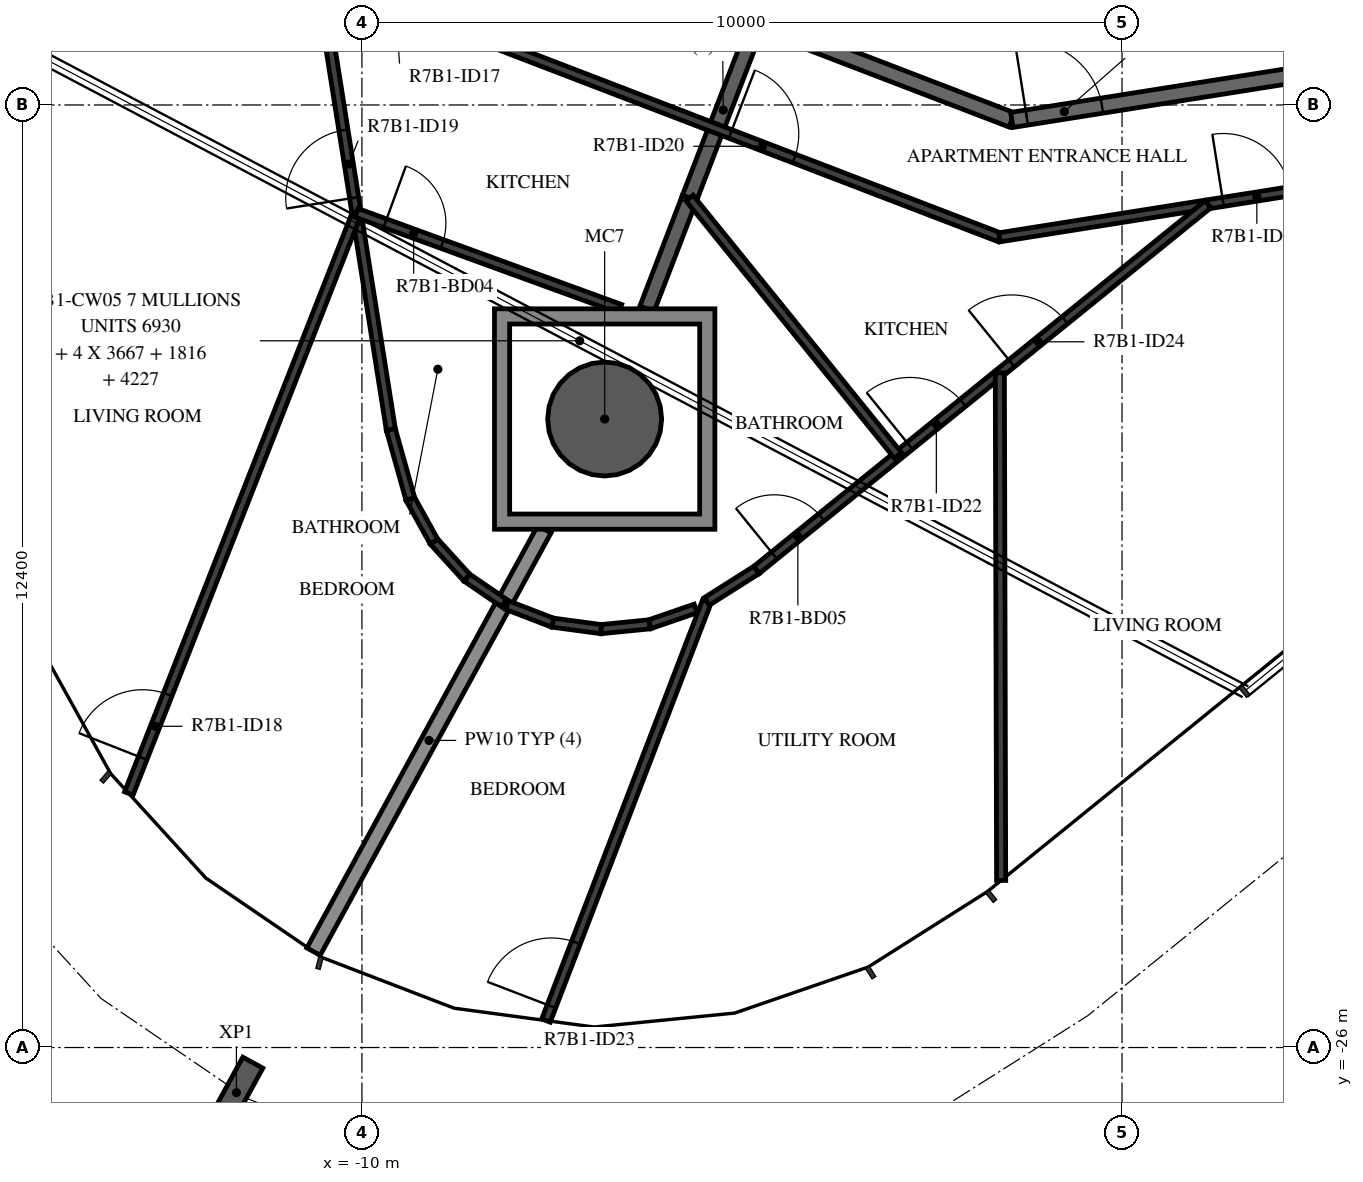
"""IFC4 building model, lengths in metres.
Left out: names, types, materials, properties, quantities, classifications, styles, units other than length and angle.
Written with IfcOpenShell. Run it as: python <this file> out.ifc"""

import sys

from ifc_helpers import new_model, si_unit, direction, frame, frame_2d, origin, origin_2d, place, context, subcontext, project, spatial, polyline, rectangle, hollow_circle, i_section, outline, extrude, element, fill, save


model = new_model("IFC4")
c1 = context("Model", 3, precision=1e-05, world=origin(), true_north=direction((0.0, 1.0)))
c2 = subcontext(c1, "Body", "Model", "MODEL_VIEW")
j1 = project(units=[si_unit("LENGTHUNIT", "METRE"), si_unit("PLANEANGLEUNIT", "RADIAN")], contexts=[c1])
p1 = place(None, origin())
s1 = spatial("IfcSite", under=j1, at=p1, CompositionType="ELEMENT")
p2 = place(p1, origin())
s2 = spatial("IfcBuilding", under=s1, at=p2, CompositionType="ELEMENT")
p3 = place(p2, frame((0.0, 0.0, 273.9)))
s3 = spatial("IfcBuildingStorey", under=s2, at=p3, CompositionType="ELEMENT", Elevation=273.9)
p4 = place(p3, frame((-6.807, -17.732, -0.38), z_axis=(0.0, 0.0, 1.0), x_axis=(1.0, 0.0, 0.0)))
e1 = element("IfcColumn", 1, at=p4, inside=s3, PredefinedType="COLUMN", context=c2, shape_type="SweptSolid", body=[
    extrude(hollow_circle(Radius=0.75, WallThickness=0.035, at=origin_2d()), origin(), (0.0, 0.0, 1.0), 3.5),
])
p5 = place(p3, frame((-11.652, -26.594, -0.38), z_axis=(0.0, 0.0, 1.0), x_axis=(-0.877434810632, 0.479695896472, 0.0)))
e2 = element("IfcColumn", 2, at=p5, inside=s3, PredefinedType="COLUMN", context=c2, shape_type="SweptSolid", body=[
    extrude(i_section(OverallWidth=0.3, OverallDepth=0.9, WebThickness=0.019, FlangeThickness=0.035, FilletRadius=0.03, at=origin_2d()), origin(), (0.0, 0.0, 1.0), 3.5),
])
p6 = place(p3, frame((-8.154, -11.223, 0.0), z_axis=(0.0, 0.0, 1.0), x_axis=(0.93359073609, -0.358341090983, 0.0)))
e3 = element("IfcWall", 3, at=p6, inside=s3, PredefinedType="STANDARD", context=c2, shape_type="SweptSolid", body=[
    extrude(rectangle(XDim=7.181, YDim=0.2, at=frame_2d((3.59, 0.0))), origin(), (0.0, 0.0, 1.0), 3.12),
])
p7 = place(p6, frame((2.39, 0.0, 0.0)))
e4 = element("IfcOpeningElement", 4, at=p7, cuts=e3, PredefinedType="OPENING", context=c2, shape_type="SweptSolid", body=[
    extrude(rectangle(XDim=1.0, YDim=2.1, at=frame_2d((0.5, 1.05))), frame((0.0, 0.11, 0.0), z_axis=(0.0, -1.0, 0.0), x_axis=(1.0, 0.0, 0.0)), (0.0, 0.0, 1.0), 0.22),
])
p8 = place(p3, frame((-1.45, -13.797, 0.0), z_axis=(0.0, 0.0, 1.0), x_axis=(0.987690361611, 0.156421704315, 0.0)))
e5 = element("IfcWall", 5, at=p8, inside=s3, PredefinedType="STANDARD", context=c2, shape_type="SweptSolid", body=[
    extrude(rectangle(XDim=7.181, YDim=0.2, at=frame_2d((3.591, 0.0))), origin(), (0.0, 0.0, 1.0), 3.12),
])
p9 = place(p8, frame((0.2, 0.0, 0.0)))
e6 = element("IfcOpeningElement", 6, at=p9, cuts=e5, PredefinedType="OPENING", context=c2, shape_type="SweptSolid", body=[
    extrude(rectangle(XDim=1.0, YDim=2.1, at=frame_2d((0.5, 1.05))), frame((0.0, 0.11, 0.0), z_axis=(0.0, -1.0, 0.0), x_axis=(1.0, 0.0, 0.0)), (0.0, 0.0, 1.0), 0.22),
])
p10 = place(p3, frame((-5.69, -14.824, 0.0), z_axis=(0.0, 0.0, 1.0), x_axis=(0.358345342952, 0.933589104041, 0.0)))
e7 = element("IfcWall", 7, at=p10, inside=s3, PredefinedType="STANDARD", context=c2, shape_type="SweptSolid", body=[
    extrude(rectangle(XDim=2.479, YDim=0.2, at=frame_2d((1.239, 0.0))), origin(), (0.0, 0.0, 1.0), 3.12),
])
p11 = place(p3, frame((-6.25, -16.282, 0.0), z_axis=(0.0, 0.0, 1.0), x_axis=(0.358360842469, 0.933583154617, 0.0)))
e8 = element("IfcWall", 8, at=p11, inside=s3, PredefinedType="STANDARD", context=c2, shape_type="SweptSolid", body=[
    extrude(rectangle(XDim=1.562, YDim=0.2, at=frame_2d((0.781, 0.0))), origin(), (0.0, 0.0, 1.0), 3.12),
])
p12 = place(p3, frame((-10.637, -24.738, 0.0), z_axis=(0.0, 0.0, 1.0), x_axis=(0.479683887596, 0.877441375808, 0.0)))
e9 = element("IfcWall", 9, at=p12, inside=s3, PredefinedType="STANDARD", context=c2, shape_type="SweptSolid", body=[
    extrude(rectangle(XDim=6.333, YDim=0.2, at=frame_2d((3.166, 0.0))), origin(), (0.0, 0.0, 1.0), 2.73),
])
p13 = place(p3, frame((-9.067, -12.479, 0.0), z_axis=(0.0, 0.0, 1.0), x_axis=(0.933579449035, -0.358370495911, 0.0)))
e10 = element("IfcWall", 10, at=p13, inside=s3, PredefinedType="PARTITIONING", context=c2, shape_type="SweptSolid", body=[
    extrude(rectangle(XDim=7.985, YDim=0.12, at=frame_2d((3.992, 0.0))), origin(), (0.0, 0.0, 1.0), 3.12),
])
p14 = place(p13, frame((4.192, 0.0, 0.0)))
e11 = element("IfcOpeningElement", 11, at=p14, cuts=e10, PredefinedType="OPENING", context=c2, shape_type="SweptSolid", body=[
    extrude(rectangle(XDim=0.9, YDim=2.1, at=frame_2d((0.45, 1.05))), frame((0.0, 0.07, 0.0), z_axis=(0.0, -1.0, 0.0), x_axis=(1.0, 0.0, 0.0)), (0.0, 0.0, 1.0), 0.14),
])
p15 = place(p3, frame((-9.619, -17.871, 0.0), z_axis=(0.0, 0.0, 1.0), x_axis=(-0.156433255633, 0.987688532146, 0.0)))
e12 = element("IfcWall", 12, at=p15, inside=s3, PredefinedType="PARTITIONING", context=c2, shape_type="SweptSolid", body=[
    extrude(rectangle(XDim=7.644, YDim=0.12, at=frame_2d((3.822, 0.0))), origin(), (0.0, 0.0, 1.0), 3.12),
])
p16 = place(p15, frame((3.087, 0.0, 0.0)))
e13 = element("IfcOpeningElement", 13, at=p16, cuts=e12, PredefinedType="OPENING", context=c2, shape_type="SweptSolid", body=[
    extrude(rectangle(XDim=0.9, YDim=2.1, at=frame_2d((0.45, 1.05))), frame((0.0, 0.07, 0.0), z_axis=(0.0, -1.0, 0.0), x_axis=(1.0, 0.0, 0.0)), (0.0, 0.0, 1.0), 0.14),
])
p17 = place(p3, frame((-13.067, -22.658, 0.0), z_axis=(0.0, 0.0, 1.0), x_axis=(0.365785999331, 0.930698986082, 0.0)))
e14 = element("IfcWall", 14, at=p17, inside=s3, PredefinedType="PARTITIONING", context=c2, shape_type="SweptSolid", body=[
    extrude(rectangle(XDim=8.196, YDim=0.12, at=frame_2d((4.098, 0.0))), origin(), (0.0, 0.0, 1.0), 3.12),
])
p18 = place(p17, frame((0.5, 0.0, 0.0)))
e15 = element("IfcOpeningElement", 15, at=p18, cuts=e14, PredefinedType="OPENING", context=c2, shape_type="SweptSolid", body=[
    extrude(rectangle(XDim=0.9, YDim=2.1, at=frame_2d((0.45, 1.05))), frame((0.0, 0.07, 0.0), z_axis=(0.0, -1.0, 0.0), x_axis=(1.0, 0.0, 0.0)), (0.0, 0.0, 1.0), 0.14),
])
p19 = place(p3, frame((-10.071, -15.019, 0.0), z_axis=(0.0, 0.0, 1.0), x_axis=(0.939648507355, -0.34214131967, 0.0)))
e16 = element("IfcWall", 16, at=p19, inside=s3, PredefinedType="PARTITIONING", context=c2, shape_type="SweptSolid", body=[
    extrude(rectangle(XDim=3.691, YDim=0.12, at=frame_2d((1.846, 0.0))), origin(), (0.0, 0.0, 1.0), 3.12),
])
p20 = place(p19, frame((0.4, 0.0, 0.0)))
e17 = element("IfcOpeningElement", 17, at=p20, cuts=e16, PredefinedType="OPENING", context=c2, shape_type="SweptSolid", body=[
    extrude(rectangle(XDim=0.8, YDim=2.1, at=frame_2d((0.4, 1.05))), frame((0.0, 0.07, 0.0), z_axis=(0.0, -1.0, 0.0), x_axis=(1.0, 0.0, 0.0)), (0.0, 0.0, 1.0), 0.14),
])
p21 = place(p3, frame((-8.13, -20.153, 0.0), z_axis=(0.0, 0.0, 1.0), x_axis=(-0.825599905246, 0.564255967145, 0.0)))
e18 = element("IfcWall", 18, at=p21, inside=s3, PredefinedType="PARTITIONING", context=c2, shape_type="SweptSolid", body=[
    extrude(rectangle(XDim=0.593, YDim=0.12, at=frame_2d((0.297, 0.0))), origin(), (0.0, 0.0, 1.0), 3.12),
])
for number, where, z_axis, x_axis in (
    (19, (-8.62, -19.818, 0.0), (0.0, 0.0, 1.0), (-0.673, 0.739, 0.0)),
    (20, (-9.052, -19.344, 0.0), (0.0, 0.0, 1.0), (-0.485, 0.874, 0.0)),
):
    element("IfcWall", number, at=place(p3, frame(where, z_axis=z_axis, x_axis=x_axis)), inside=s3, PredefinedType="PARTITIONING", context=c2, shape_type="SweptSolid", body=[
        extrude(rectangle(XDim=0.642, YDim=0.12, at=frame_2d((0.321, 0.0))), origin(), (0.0, 0.0, 1.0), 3.12),
    ])
p22 = place(p3, frame((-9.364, -18.782, 0.0), z_axis=(0.0, 0.0, 1.0), x_axis=(-0.269811707714, 0.962913102196, 0.0)))
e21 = element("IfcWall", 21, at=p22, inside=s3, PredefinedType="PARTITIONING", context=c2, shape_type="SweptSolid", body=[
    extrude(rectangle(XDim=0.947, YDim=0.12, at=frame_2d((0.473, 0.0))), origin(), (0.0, 0.0, 1.0), 3.12),
])
p23 = place(p3, frame((-1.612, -15.341, 0.0), z_axis=(0.0, 0.0, 1.0), x_axis=(0.987687560018, 0.15643939333, 0.0)))
e22 = element("IfcWall", 22, at=p23, inside=s3, PredefinedType="PARTITIONING", context=c2, shape_type="SweptSolid", body=[
    extrude(rectangle(XDim=7.914, YDim=0.12, at=frame_2d((3.957, 0.0))), origin(), (0.0, 0.0, 1.0), 3.12),
])
p24 = place(p23, frame((2.978, 0.0, 0.0)))
e23 = element("IfcOpeningElement", 23, at=p24, cuts=e22, PredefinedType="OPENING", context=c2, shape_type="SweptSolid", body=[
    extrude(rectangle(XDim=0.9, YDim=2.1, at=frame_2d((0.45, 1.05))), frame((0.0, 0.07, 0.0), z_axis=(0.0, -1.0, 0.0), x_axis=(1.0, 0.0, 0.0)), (0.0, 0.0, 1.0), 0.14),
])
p25 = place(p3, frame((-5.609, -20.223, 0.0), z_axis=(0.0, 0.0, 1.0), x_axis=(-0.945401267449, -0.325908642882, 0.0)))
e24 = element("IfcWall", 24, at=p25, inside=s3, PredefinedType="PARTITIONING", context=c2, shape_type="SweptSolid", body=[
    extrude(rectangle(XDim=0.642, YDim=0.12, at=frame_2d((0.321, 0.0))), origin(), (0.0, 0.0, 1.0), 3.12),
])
for number, where, z_axis, x_axis in (
    (25, (-6.216, -20.433, 0.0), (0.0, 0.0, 1.0), (-0.995, -0.099, 0.0)),
    (26, (-6.855, -20.496, 0.0), (0.0, 0.0, 1.0), (-0.991, 0.133, 0.0)),
    (27, (-7.491, -20.41, 0.0), (0.0, 0.0, 1.0), (-0.933, 0.359, 0.0)),
):
    element("IfcWall", number, at=place(p3, frame(where, z_axis=z_axis, x_axis=x_axis)), inside=s3, PredefinedType="PARTITIONING", context=c2, shape_type="SweptSolid", body=[
        extrude(rectangle(XDim=0.642, YDim=0.12, at=frame_2d((0.321, 0.0))), origin(), (0.0, 0.0, 1.0), 3.12),
    ])
p26 = place(p3, frame((-7.579, -25.646, 0.0), z_axis=(0.0, 0.0, 1.0), x_axis=(0.358336526264, 0.933592488158, 0.0)))
e28 = element("IfcWall", 28, at=p26, inside=s3, PredefinedType="PARTITIONING", context=c2, shape_type="SweptSolid", body=[
    extrude(rectangle(XDim=5.908, YDim=0.12, at=frame_2d((2.954, 0.0))), origin(), (0.0, 0.0, 1.0), 3.12),
])
p27 = place(p26, frame((0.2, 0.0, 0.0)))
e29 = element("IfcOpeningElement", 29, at=p27, cuts=e28, PredefinedType="OPENING", context=c2, shape_type="SweptSolid", body=[
    extrude(rectangle(XDim=0.9, YDim=2.1, at=frame_2d((0.45, 1.05))), frame((0.0, 0.07, 0.0), z_axis=(0.0, -1.0, 0.0), x_axis=(1.0, 0.0, 0.0)), (0.0, 0.0, 1.0), 0.14),
])
p28 = place(p3, frame((-5.462, -20.13, 0.0), z_axis=(0.0, 0.0, 1.0), x_axis=(0.84494764883, 0.534849016768, 0.0)))
e30 = element("IfcWall", 30, at=p28, inside=s3, PredefinedType="PARTITIONING", context=c2, shape_type="SweptSolid", body=[
    extrude(rectangle(XDim=0.772, YDim=0.12, at=frame_2d((0.386, 0.0))), origin(), (0.0, 0.0, 1.0), 3.12),
])
p29 = place(p3, frame((-4.809, -19.717, 0.0), z_axis=(0.0, 0.0, 1.0), x_axis=(0.777140730041, 0.629326851255, 0.0)))
e31 = element("IfcWall", 31, at=p29, inside=s3, PredefinedType="PARTITIONING", context=c2, shape_type="SweptSolid", body=[
    extrude(rectangle(XDim=7.644, YDim=0.12, at=frame_2d((3.822, 0.0))), origin(), (0.0, 0.0, 1.0), 3.12),
])
p30 = place(p29, frame((2.594, 0.0, 0.0)))
e32 = element("IfcOpeningElement", 32, at=p30, cuts=e31, PredefinedType="OPENING", context=c2, shape_type="SweptSolid", body=[
    extrude(rectangle(XDim=0.9, YDim=2.1, at=frame_2d((0.45, 1.05))), frame((0.0, 0.07, 0.0), z_axis=(0.0, -1.0, 0.0), x_axis=(1.0, 0.0, 0.0)), (0.0, 0.0, 1.0), 0.14),
])
p31 = place(p29, frame((0.3, 0.0, 0.0)))
e33 = element("IfcOpeningElement", 33, at=p31, cuts=e31, PredefinedType="OPENING", context=c2, shape_type="SweptSolid", body=[
    extrude(rectangle(XDim=0.8, YDim=2.1, at=frame_2d((0.4, 1.05))), frame((0.0, 0.07, 0.0), z_axis=(0.0, -1.0, 0.0), x_axis=(1.0, 0.0, 0.0)), (0.0, 0.0, 1.0), 0.14),
])
p32 = place(p29, frame((4.319, 0.0, 0.0)))
e34 = element("IfcOpeningElement", 34, at=p32, cuts=e31, PredefinedType="OPENING", context=c2, shape_type="SweptSolid", body=[
    extrude(rectangle(XDim=0.9, YDim=2.1, at=frame_2d((0.45, 1.05))), frame((0.0, 0.07, 0.0), z_axis=(0.0, -1.0, 0.0), x_axis=(1.0, 0.0, 0.0)), (0.0, 0.0, 1.0), 0.14),
])
p33 = place(p3, frame((-2.948, -18.21, 0.0), z_axis=(0.0, 0.0, 1.0), x_axis=(-0.629330389268, 0.777137864953, 0.0)))
e35 = element("IfcWall", 35, at=p33, inside=s3, PredefinedType="PARTITIONING", context=c2, shape_type="SweptSolid", body=[
    extrude(rectangle(XDim=4.357, YDim=0.12, at=frame_2d((2.179, 0.0))), origin(), (0.0, 0.0, 1.0), 3.12),
])
p34 = place(p3, frame((-1.591, -23.802, 0.0), z_axis=(0.0, 0.0, 1.0), x_axis=(-0.002595969315, 0.999996630466, 0.0)))
e36 = element("IfcWall", 36, at=p34, inside=s3, PredefinedType="PARTITIONING", context=c2, shape_type="SweptSolid", body=[
    extrude(rectangle(XDim=6.677, YDim=0.12, at=frame_2d((3.339, 0.0))), origin(), (0.0, 0.0, 1.0), 3.12),
])
p35 = place(p3, origin())
e37 = element("IfcWall", 37, at=p35, inside=s3, PredefinedType="STANDARD", context=c2, shape_type="SweptSolid", body=[
    extrude(outline(polyline([(-5.357, -16.282), (-5.357, -19.182), (-8.257, -19.182), (-8.257, -16.282), (-5.357, -16.282)]), holes=[polyline([(-8.057, -18.982), (-5.557, -18.982), (-5.557, -16.482), (-8.057, -16.482), (-8.057, -18.982)])]), origin(), (0.0, 0.0, 1.0), 3.12),
])
p36 = place(p18, origin())
e38 = element("IfcDoor", 38, at=p36, inside=s3, OperationType="SINGLE_SWING_RIGHT", PredefinedType="DOOR", context=c2, shape_type="SweptSolid", body=[
    extrude(rectangle(XDim=0.9, YDim=2.1, at=frame_2d((0.45, 1.05))), frame((0.0, 0.025, 0.0), z_axis=(0.0, -1.0, 0.0), x_axis=(1.0, 0.0, 0.0)), (0.0, 0.0, 1.0), 0.05),
])
fill(e15, e38)
p37 = place(p20, origin())
e39 = element("IfcDoor", 39, at=p37, inside=s3, OperationType="SINGLE_SWING_RIGHT", PredefinedType="DOOR", context=c2, shape_type="SweptSolid", body=[
    extrude(rectangle(XDim=0.8, YDim=2.1, at=frame_2d((0.4, 1.05))), frame((0.0, 0.025, 0.0), z_axis=(0.0, -1.0, 0.0), x_axis=(1.0, 0.0, 0.0)), (0.0, 0.0, 1.0), 0.05),
])
fill(e17, e39)
p38 = place(p16, origin())
e40 = element("IfcDoor", 40, at=p38, inside=s3, OperationType="SINGLE_SWING_LEFT", PredefinedType="DOOR", context=c2, shape_type="SweptSolid", body=[
    extrude(rectangle(XDim=0.9, YDim=2.1, at=frame_2d((0.45, 1.05))), frame((0.0, 0.025, 0.0), z_axis=(0.0, -1.0, 0.0), x_axis=(1.0, 0.0, 0.0)), (0.0, 0.0, 1.0), 0.05),
])
fill(e13, e40)
p39 = place(p9, origin())
e41 = element("IfcDoor", 41, at=p39, inside=s3, OperationType="SINGLE_SWING_LEFT", PredefinedType="DOOR", context=c2, shape_type="SweptSolid", body=[
    extrude(rectangle(XDim=1.0, YDim=2.1, at=frame_2d((0.5, 1.05))), frame((0.0, 0.025, 0.0), z_axis=(0.0, -1.0, 0.0), x_axis=(1.0, 0.0, 0.0)), (0.0, 0.0, 1.0), 0.05),
])
fill(e6, e41)
p40 = place(p14, origin())
e42 = element("IfcDoor", 42, at=p40, inside=s3, OperationType="SINGLE_SWING_RIGHT", PredefinedType="DOOR", context=c2, shape_type="SweptSolid", body=[
    extrude(rectangle(XDim=0.9, YDim=2.1, at=frame_2d((0.45, 1.05))), frame((0.0, 0.025, 0.0), z_axis=(0.0, -1.0, 0.0), x_axis=(1.0, 0.0, 0.0)), (0.0, 0.0, 1.0), 0.05),
])
fill(e11, e42)
p41 = place(p24, origin())
e43 = element("IfcDoor", 43, at=p41, inside=s3, OperationType="SINGLE_SWING_LEFT", PredefinedType="DOOR", context=c2, shape_type="SweptSolid", body=[
    extrude(rectangle(XDim=0.9, YDim=2.1, at=frame_2d((0.45, 1.05))), frame((0.0, 0.025, 0.0), z_axis=(0.0, -1.0, 0.0), x_axis=(1.0, 0.0, 0.0)), (0.0, 0.0, 1.0), 0.05),
])
fill(e23, e43)
p42 = place(p30, origin())
e44 = element("IfcDoor", 44, at=p42, inside=s3, OperationType="SINGLE_SWING_LEFT", PredefinedType="DOOR", context=c2, shape_type="SweptSolid", body=[
    extrude(rectangle(XDim=0.9, YDim=2.1, at=frame_2d((0.45, 1.05))), frame((0.0, 0.025, 0.0), z_axis=(0.0, -1.0, 0.0), x_axis=(1.0, 0.0, 0.0)), (0.0, 0.0, 1.0), 0.05),
])
fill(e32, e44)
p43 = place(p27, origin())
e45 = element("IfcDoor", 45, at=p43, inside=s3, OperationType="SINGLE_SWING_LEFT", PredefinedType="DOOR", context=c2, shape_type="SweptSolid", body=[
    extrude(rectangle(XDim=0.9, YDim=2.1, at=frame_2d((0.45, 1.05))), frame((0.0, 0.025, 0.0), z_axis=(0.0, -1.0, 0.0), x_axis=(1.0, 0.0, 0.0)), (0.0, 0.0, 1.0), 0.05),
])
fill(e29, e45)
p44 = place(p31, origin())
e46 = element("IfcDoor", 46, at=p44, inside=s3, OperationType="SINGLE_SWING_RIGHT", PredefinedType="DOOR", context=c2, shape_type="SweptSolid", body=[
    extrude(rectangle(XDim=0.8, YDim=2.1, at=frame_2d((0.4, 1.05))), frame((0.0, 0.025, 0.0), z_axis=(0.0, -1.0, 0.0), x_axis=(1.0, 0.0, 0.0)), (0.0, 0.0, 1.0), 0.05),
])
fill(e33, e46)
p45 = place(p32, origin())
e47 = element("IfcDoor", 47, at=p45, inside=s3, OperationType="SINGLE_SWING_RIGHT", PredefinedType="DOOR", context=c2, shape_type="SweptSolid", body=[
    extrude(rectangle(XDim=0.9, YDim=2.1, at=frame_2d((0.45, 1.05))), frame((0.0, 0.025, 0.0), z_axis=(0.0, -1.0, 0.0), x_axis=(1.0, 0.0, 0.0)), (0.0, 0.0, 1.0), 0.05),
])
fill(e34, e47)
save(model, sys.argv[1])
